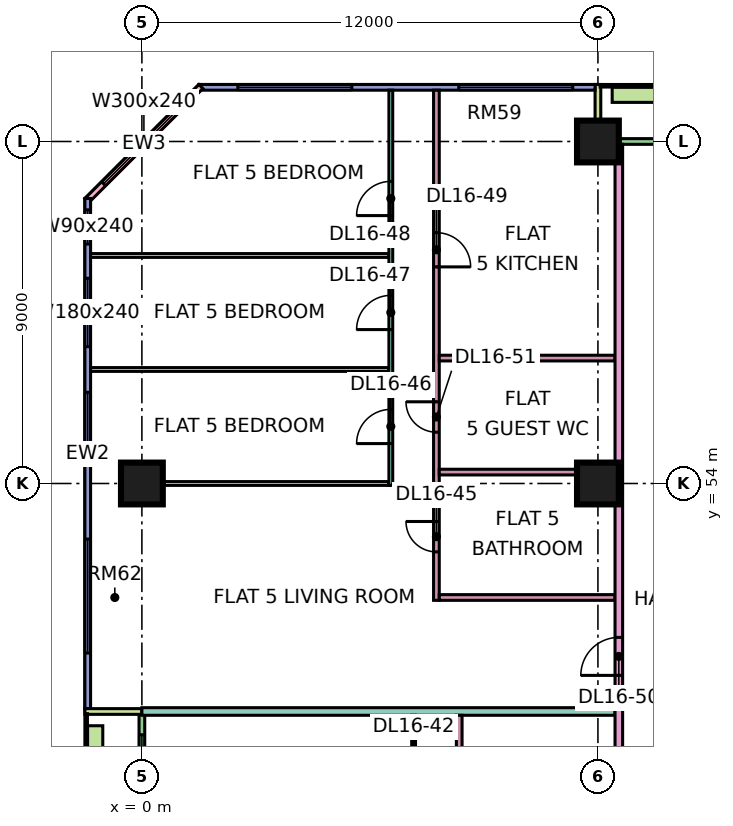
"""IFC4 building model, lengths in metres.
Left out: names, types, materials, properties, quantities, classifications, styles, units other than length and angle.
Written with IfcOpenShell. Run it as: python <this file> out.ifc"""

import sys

from ifc_helpers import new_model, si_unit, direction, frame, frame_2d, origin, origin_2d, place, context, subcontext, project, spatial, rectangle, extrude, element, fill, save


model = new_model("IFC4")
c1 = context("Model", 3, precision=1e-05, world=origin(), true_north=direction((0.0, 1.0)))
c2 = subcontext(c1, "Body", "Model", "MODEL_VIEW")
j1 = project(units=[si_unit("LENGTHUNIT", "METRE"), si_unit("PLANEANGLEUNIT", "RADIAN")], contexts=[c1])
p1 = place(None, origin())
s1 = spatial("IfcSite", under=j1, at=p1, CompositionType="ELEMENT")
p2 = place(p1, origin())
s2 = spatial("IfcBuilding", under=s1, at=p2, CompositionType="ELEMENT")
p3 = place(p2, frame((0.0, 0.0, 75.15)))
s3 = spatial("IfcBuildingStorey", under=s2, at=p3, CompositionType="ELEMENT", Elevation=75.15)
p4 = place(p3, frame((0.0, 54.0, 0.0), z_axis=(0.0, 0.0, 1.0), x_axis=(1.0, 0.0, 0.0)))
e1 = element("IfcColumn", 1, at=p4, inside=s3, PredefinedType="COLUMN", context=c2, shape_type="SweptSolid", body=[
    extrude(rectangle(XDim=1.1, YDim=1.1, at=origin_2d()), origin(), (0.0, 0.0, 1.0), 3.75),
])
for number, where, z_axis, x_axis in (
    (2, (12.0, 54.0, 0.0), (0.0, 0.0, 1.0), (1.0, 0.0, 0.0)),
    (3, (12.0, 63.0, 0.0), (0.0, 0.0, 1.0), (1.0, 0.0, 0.0)),
):
    element("IfcColumn", number, at=place(p3, frame(where, z_axis=z_axis, x_axis=x_axis)), inside=s3, PredefinedType="COLUMN", context=c2, shape_type="SweptSolid", body=[
        extrude(rectangle(XDim=1.1, YDim=1.1, at=origin_2d()), origin(), (0.0, 0.0, 1.0), 3.75),
    ])
p5 = place(p3, frame((22.425, 63.0, 0.0), z_axis=(0.0, 0.0, 1.0), x_axis=(-1.0, 0.0, 0.0)))
e4 = element("IfcWall", 4, at=p5, inside=s3, PredefinedType="SOLIDWALL", context=c2, shape_type="SweptSolid", body=[
    extrude(rectangle(XDim=10.35, YDim=0.15, at=frame_2d((5.175, 0.0))), origin(), (0.0, 0.0, 1.0), 3.35),
])
p6 = place(p5, frame((2.512, 0.0, 0.0)))
e5 = element("IfcOpeningElement", 5, at=p6, cuts=e4, PredefinedType="OPENING", context=c2, shape_type="SweptSolid", body=[
    extrude(rectangle(XDim=1.8, YDim=2.4, at=frame_2d((0.9, 1.2))), frame((0.0, 0.085, 0.0), z_axis=(0.0, -1.0, 0.0), x_axis=(1.0, 0.0, 0.0)), (0.0, 0.0, 1.0), 0.17),
])
p7 = place(p3, frame((12.0, 64.5, 0.0), z_axis=(0.0, 0.0, 1.0), x_axis=(0.0, -1.0, 0.0)))
e6 = element("IfcWall", 6, at=p7, inside=s3, PredefinedType="SOLIDWALL", context=c2, shape_type="SweptSolid", body=[
    extrude(rectangle(XDim=1.5, YDim=0.15, at=frame_2d((0.75, 0.0))), origin(), (0.0, 0.0, 1.0), 3.35),
])
p8 = place(p3, frame((11.925, 64.425, 0.0), z_axis=(0.0, 0.0, 1.0), x_axis=(-1.0, 0.0, 0.0)))
e7 = element("IfcWall", 7, at=p8, inside=s3, PredefinedType="SOLIDWALL", context=c2, shape_type="SweptSolid", body=[
    extrude(rectangle(XDim=10.425, YDim=0.15, at=frame_2d((5.212, 0.0))), origin(), (0.0, 0.0, 1.0), 3.35),
])
p9 = place(p8, frame((0.587, 0.0, 0.45)))
e8 = element("IfcOpeningElement", 8, at=p9, cuts=e7, PredefinedType="OPENING", context=c2, shape_type="SweptSolid", body=[
    extrude(rectangle(XDim=3.0, YDim=2.4, at=frame_2d((1.5, 1.2))), frame((0.0, 0.085, 0.0), z_axis=(0.0, -1.0, 0.0), x_axis=(1.0, 0.0, 0.0)), (0.0, 0.0, 1.0), 0.17),
])
p10 = place(p8, frame((6.4, 0.0, 0.45)))
e9 = element("IfcOpeningElement", 9, at=p10, cuts=e7, PredefinedType="OPENING", context=c2, shape_type="SweptSolid", body=[
    extrude(rectangle(XDim=3.0, YDim=2.4, at=frame_2d((1.5, 1.2))), frame((0.0, 0.085, 0.0), z_axis=(0.0, -1.0, 0.0), x_axis=(1.0, 0.0, 0.0)), (0.0, 0.0, 1.0), 0.17),
])
p11 = place(p3, frame((1.553, 64.447, 0.0), z_axis=(0.0, 0.0, 1.0), x_axis=(-0.707106781187, -0.707106781187, 0.0)))
e10 = element("IfcWall", 10, at=p11, inside=s3, PredefinedType="SOLIDWALL", context=c2, shape_type="SweptSolid", body=[
    extrude(rectangle(XDim=4.243, YDim=0.15, at=frame_2d((2.121, 0.0))), origin(), (0.0, 0.0, 1.0), 3.35),
])
p12 = place(p11, frame((0.621, 0.0, 0.45)))
e11 = element("IfcOpeningElement", 11, at=p12, cuts=e10, PredefinedType="OPENING", context=c2, shape_type="SweptSolid", body=[
    extrude(rectangle(XDim=3.0, YDim=2.4, at=frame_2d((1.5, 1.2))), frame((0.0, 0.085, 0.0), z_axis=(0.0, -1.0, 0.0), x_axis=(1.0, 0.0, 0.0)), (0.0, 0.0, 1.0), 0.17),
])
p13 = place(p3, frame((-1.425, 61.5, 0.0), z_axis=(0.0, 0.0, 1.0), x_axis=(0.0, -1.0, 0.0)))
e12 = element("IfcWall", 12, at=p13, inside=s3, PredefinedType="SOLIDWALL", context=c2, shape_type="SweptSolid", body=[
    extrude(rectangle(XDim=13.425, YDim=0.15, at=frame_2d((6.712, 0.0))), origin(), (0.0, 0.0, 1.0), 3.35),
])
p14 = place(p13, frame((0.3, 0.0, 0.45)))
e13 = element("IfcOpeningElement", 13, at=p14, cuts=e12, PredefinedType="OPENING", context=c2, shape_type="SweptSolid", body=[
    extrude(rectangle(XDim=0.9, YDim=2.4, at=frame_2d((0.45, 1.2))), frame((0.0, 0.085, 0.0), z_axis=(0.0, -1.0, 0.0), x_axis=(1.0, 0.0, 0.0)), (0.0, 0.0, 1.0), 0.17),
])
p15 = place(p13, frame((2.1, 0.0, 0.45)))
e14 = element("IfcOpeningElement", 14, at=p15, cuts=e12, PredefinedType="OPENING", context=c2, shape_type="SweptSolid", body=[
    extrude(rectangle(XDim=1.8, YDim=2.4, at=frame_2d((0.9, 1.2))), frame((0.0, 0.085, 0.0), z_axis=(0.0, -1.0, 0.0), x_axis=(1.0, 0.0, 0.0)), (0.0, 0.0, 1.0), 0.17),
])
p16 = place(p13, frame((5.1, 0.0, 0.45)))
e15 = element("IfcOpeningElement", 15, at=p16, cuts=e12, PredefinedType="OPENING", context=c2, shape_type="SweptSolid", body=[
    extrude(rectangle(XDim=1.8, YDim=2.4, at=frame_2d((0.9, 1.2))), frame((0.0, 0.085, 0.0), z_axis=(0.0, -1.0, 0.0), x_axis=(1.0, 0.0, 0.0)), (0.0, 0.0, 1.0), 0.17),
])
p17 = place(p13, frame((8.962, 0.0, 0.45)))
e16 = element("IfcOpeningElement", 16, at=p17, cuts=e12, PredefinedType="OPENING", context=c2, shape_type="SweptSolid", body=[
    extrude(rectangle(XDim=3.0, YDim=2.4, at=frame_2d((1.5, 1.2))), frame((0.0, 0.085, 0.0), z_axis=(0.0, -1.0, 0.0), x_axis=(1.0, 0.0, 0.0)), (0.0, 0.0, 1.0), 0.17),
])
p18 = place(p3, frame((0.0, 47.925, 0.0), z_axis=(0.0, 0.0, 1.0), x_axis=(0.0, -1.0, 0.0)))
e17 = element("IfcWall", 17, at=p18, inside=s3, PredefinedType="SOLIDWALL", context=c2, shape_type="SweptSolid", body=[
    extrude(rectangle(XDim=11.85, YDim=0.15, at=frame_2d((5.925, 0.0))), origin(), (0.0, 0.0, 1.0), 3.35),
])
p19 = place(p18, frame((0.538, 0.0, 0.45)))
e18 = element("IfcOpeningElement", 18, at=p19, cuts=e17, PredefinedType="OPENING", context=c2, shape_type="SweptSolid", body=[
    extrude(rectangle(XDim=1.2, YDim=2.4, at=frame_2d((0.6, 1.2))), frame((0.0, 0.085, 0.0), z_axis=(0.0, -1.0, 0.0), x_axis=(1.0, 0.0, 0.0)), (0.0, 0.0, 1.0), 0.17),
])
p20 = place(p18, frame((4.15, 0.0, 0.45)))
e19 = element("IfcOpeningElement", 19, at=p20, cuts=e17, PredefinedType="OPENING", context=c2, shape_type="SweptSolid", body=[
    extrude(rectangle(XDim=1.2, YDim=2.4, at=frame_2d((0.6, 1.2))), frame((0.0, 0.085, 0.0), z_axis=(0.0, -1.0, 0.0), x_axis=(1.0, 0.0, 0.0)), (0.0, 0.0, 1.0), 0.17),
])
p21 = place(p18, frame((6.525, 0.0, 0.0)))
e20 = element("IfcOpeningElement", 20, at=p21, cuts=e17, PredefinedType="OPENING", context=c2, shape_type="SweptSolid", body=[
    extrude(rectangle(XDim=1.8, YDim=2.4, at=frame_2d((0.9, 1.2))), frame((0.0, 0.085, 0.0), z_axis=(0.0, -1.0, 0.0), x_axis=(1.0, 0.0, 0.0)), (0.0, 0.0, 1.0), 0.17),
])
p22 = place(p18, frame((9.5, 0.0, 0.45)))
e21 = element("IfcOpeningElement", 21, at=p22, cuts=e17, PredefinedType="OPENING", context=c2, shape_type="SweptSolid", body=[
    extrude(rectangle(XDim=1.2, YDim=2.4, at=frame_2d((0.6, 1.2))), frame((0.0, 0.085, 0.0), z_axis=(0.0, -1.0, 0.0), x_axis=(1.0, 0.0, 0.0)), (0.0, 0.0, 1.0), 0.17),
])
p23 = place(p3, frame((-1.5, 48.0, 0.0), z_axis=(0.0, 0.0, 1.0), x_axis=(1.0, 0.0, 0.0)))
e22 = element("IfcWall", 22, at=p23, inside=s3, PredefinedType="SOLIDWALL", context=c2, shape_type="SweptSolid", body=[
    extrude(rectangle(XDim=1.5, YDim=0.15, at=frame_2d((0.75, 0.0))), origin(), (0.0, 0.0, 1.0), 3.35),
])
p24 = place(p3, frame((22.125, 64.229, 0.0), z_axis=(0.0, 0.0, 1.0), x_axis=(-1.0, 0.0, 0.0)))
e23 = element("IfcWall", 23, at=p24, inside=s3, PredefinedType="SOLIDWALL", context=c2, shape_type="SweptSolid", body=[
    extrude(rectangle(XDim=9.75, YDim=0.4, at=frame_2d((4.875, 0.0))), origin(), (0.0, 0.0, 1.0), 0.7),
])
p25 = place(p3, frame((-1.229, 47.625, 0.0), z_axis=(0.0, 0.0, 1.0), x_axis=(0.0, -1.0, 0.0)))
e24 = element("IfcWall", 24, at=p25, inside=s3, PredefinedType="SOLIDWALL", context=c2, shape_type="SweptSolid", body=[
    extrude(rectangle(XDim=11.25, YDim=0.4, at=frame_2d((5.625, 0.0))), origin(), (0.0, 0.0, 1.0), 0.7),
])
for number, where, z_axis, x_axis in (
    (25, (-1.351, 57.0, 0.0), (0.0, 0.0, 1.0), (1.0, 0.0, 0.0)),
    (26, (-1.351, 60.0, 0.0), (0.0, 0.0, 1.0), (1.0, 0.0, 0.0)),
):
    element("IfcWall", number, at=place(p3, frame(where, z_axis=z_axis, x_axis=x_axis)), inside=s3, PredefinedType="PARTITIONING", context=c2, shape_type="SweptSolid", body=[
        extrude(rectangle(XDim=7.851, YDim=0.1, at=frame_2d((3.926, 0.0))), origin(), (0.0, 0.0, 1.0), 3.35),
    ])
p26 = place(p3, frame((0.0, 48.0, 0.0), z_axis=(0.0, 0.0, 1.0), x_axis=(1.0, 0.0, 0.0)))
e27 = element("IfcWall", 27, at=p26, inside=s3, PredefinedType="PARTITIONING", context=c2, shape_type="SweptSolid", body=[
    extrude(rectangle(XDim=12.45, YDim=0.2, at=frame_2d((6.225, 0.0))), origin(), (0.0, 0.0, 1.0), 3.35),
])
e28 = element("IfcWall", 28, at=p4, inside=s3, PredefinedType="PARTITIONING", context=c2, shape_type="SweptSolid", body=[
    extrude(rectangle(XDim=6.5, YDim=0.1, at=frame_2d((3.25, 0.0))), origin(), (0.0, 0.0, 1.0), 3.35),
])
p27 = place(p3, frame((6.55, 53.95, 0.0), z_axis=(0.0, 0.0, 1.0), x_axis=(0.0, 1.0, 0.0)))
e29 = element("IfcWall", 29, at=p27, inside=s3, PredefinedType="PARTITIONING", context=c2, shape_type="SweptSolid", body=[
    extrude(rectangle(XDim=10.4, YDim=0.1, at=frame_2d((5.2, 0.0))), origin(), (0.0, 0.0, 1.0), 3.35),
])
p28 = place(p27, frame((1.1, 0.0, 0.0)))
e30 = element("IfcOpeningElement", 30, at=p28, cuts=e29, PredefinedType="OPENING", context=c2, shape_type="SweptSolid", body=[
    extrude(rectangle(XDim=0.9, YDim=2.1, at=frame_2d((0.45, 1.05))), frame((0.0, 0.06, 0.0), z_axis=(0.0, -1.0, 0.0), x_axis=(1.0, 0.0, 0.0)), (0.0, 0.0, 1.0), 0.12),
])
p29 = place(p27, frame((4.1, 0.0, 0.0)))
e31 = element("IfcOpeningElement", 31, at=p29, cuts=e29, PredefinedType="OPENING", context=c2, shape_type="SweptSolid", body=[
    extrude(rectangle(XDim=0.9, YDim=2.1, at=frame_2d((0.45, 1.05))), frame((0.0, 0.06, 0.0), z_axis=(0.0, -1.0, 0.0), x_axis=(1.0, 0.0, 0.0)), (0.0, 0.0, 1.0), 0.12),
])
p30 = place(p27, frame((7.1, 0.0, 0.0)))
e32 = element("IfcOpeningElement", 32, at=p30, cuts=e29, PredefinedType="OPENING", context=c2, shape_type="SweptSolid", body=[
    extrude(rectangle(XDim=0.9, YDim=2.1, at=frame_2d((0.45, 1.05))), frame((0.0, 0.06, 0.0), z_axis=(0.0, -1.0, 0.0), x_axis=(1.0, 0.0, 0.0)), (0.0, 0.0, 1.0), 0.12),
])
p31 = place(p3, frame((7.15, 42.05, 0.0), z_axis=(0.0, 0.0, 1.0), x_axis=(0.0, 1.0, 0.0)))
e33 = element("IfcWall", 33, at=p31, inside=s3, PredefinedType="PARTITIONING", context=c2, shape_type="SweptSolid", body=[
    extrude(rectangle(XDim=5.85, YDim=0.1, at=frame_2d((2.925, 0.0))), origin(), (0.0, 0.0, 1.0), 3.35),
])
p32 = place(p31, frame((1.0, 0.0, 0.0)))
e34 = element("IfcOpeningElement", 34, at=p32, cuts=e33, PredefinedType="OPENING", context=c2, shape_type="SweptSolid", body=[
    extrude(rectangle(XDim=0.9, YDim=2.1, at=frame_2d((0.45, 1.05))), frame((0.0, 0.06, 0.0), z_axis=(0.0, -1.0, 0.0), x_axis=(1.0, 0.0, 0.0)), (0.0, 0.0, 1.0), 0.12),
])
p33 = place(p31, frame((4.0, 0.0, 0.0)))
e35 = element("IfcOpeningElement", 35, at=p33, cuts=e33, PredefinedType="OPENING", context=c2, shape_type="SweptSolid", body=[
    extrude(rectangle(XDim=0.9, YDim=2.1, at=frame_2d((0.45, 1.05))), frame((0.0, 0.06, 0.0), z_axis=(0.0, -1.0, 0.0), x_axis=(1.0, 0.0, 0.0)), (0.0, 0.0, 1.0), 0.12),
])
p34 = place(p3, frame((7.75, 50.925, 0.0), z_axis=(0.0, 0.0, 1.0), x_axis=(0.0, 1.0, 0.0)))
e36 = element("IfcWall", 36, at=p34, inside=s3, PredefinedType="PARTITIONING", context=c2, shape_type="SweptSolid", body=[
    extrude(rectangle(XDim=13.425, YDim=0.15, at=frame_2d((6.712, 0.0))), origin(), (0.0, 0.0, 1.0), 3.35),
])
p35 = place(p34, frame((1.275, 0.0, 0.0)))
e37 = element("IfcOpeningElement", 37, at=p35, cuts=e36, PredefinedType="OPENING", context=c2, shape_type="SweptSolid", body=[
    extrude(rectangle(XDim=0.8, YDim=2.1, at=frame_2d((0.4, 1.05))), frame((0.0, 0.085, 0.0), z_axis=(0.0, -1.0, 0.0), x_axis=(1.0, 0.0, 0.0)), (0.0, 0.0, 1.0), 0.17),
])
p36 = place(p34, frame((8.775, 0.0, 0.0)))
e38 = element("IfcOpeningElement", 38, at=p36, cuts=e36, PredefinedType="OPENING", context=c2, shape_type="SweptSolid", body=[
    extrude(rectangle(XDim=0.9, YDim=2.1, at=frame_2d((0.45, 1.05))), frame((0.0, 0.085, 0.0), z_axis=(0.0, -1.0, 0.0), x_axis=(1.0, 0.0, 0.0)), (0.0, 0.0, 1.0), 0.17),
])
p37 = place(p34, frame((4.425, 0.0, 0.0)))
e39 = element("IfcOpeningElement", 39, at=p37, cuts=e36, PredefinedType="OPENING", context=c2, shape_type="SweptSolid", body=[
    extrude(rectangle(XDim=0.8, YDim=2.1, at=frame_2d((0.4, 1.05))), frame((0.0, 0.085, 0.0), z_axis=(0.0, -1.0, 0.0), x_axis=(1.0, 0.0, 0.0)), (0.0, 0.0, 1.0), 0.17),
])
for number, where, z_axis, x_axis in (
    (40, (7.825, 51.0, 0.0), (0.0, 0.0, 1.0), (1.0, 0.0, 0.0)),
    (41, (7.825, 54.3, 0.0), (0.0, 0.0, 1.0), (1.0, 0.0, 0.0)),
    (42, (7.825, 57.3, 0.0), (0.0, 0.0, 1.0), (1.0, 0.0, 0.0)),
):
    element("IfcWall", number, at=place(p3, frame(where, z_axis=z_axis, x_axis=x_axis)), inside=s3, PredefinedType="PARTITIONING", context=c2, shape_type="SweptSolid", body=[
        extrude(rectangle(XDim=4.625, YDim=0.15, at=frame_2d((2.312, 0.0))), origin(), (0.0, 0.0, 1.0), 3.35),
    ])
p38 = place(p3, frame((8.35, 39.225, 0.0), z_axis=(0.0, 0.0, 1.0), x_axis=(0.0, 1.0, 0.0)))
e43 = element("IfcWall", 43, at=p38, inside=s3, PredefinedType="PARTITIONING", context=c2, shape_type="SweptSolid", body=[
    extrude(rectangle(XDim=8.675, YDim=0.15, at=frame_2d((4.337, 0.0))), origin(), (0.0, 0.0, 1.0), 3.35),
])
p39 = place(p38, frame((5.025, 0.0, 0.0)))
e44 = element("IfcOpeningElement", 44, at=p39, cuts=e43, PredefinedType="OPENING", context=c2, shape_type="SweptSolid", body=[
    extrude(rectangle(XDim=0.9, YDim=2.1, at=frame_2d((0.45, 1.05))), frame((0.0, 0.085, 0.0), z_axis=(0.0, -1.0, 0.0), x_axis=(1.0, 0.0, 0.0)), (0.0, 0.0, 1.0), 0.17),
])
p40 = place(p3, frame((12.55, 20.0, 0.0), z_axis=(0.0, 0.0, 1.0), x_axis=(0.0, 1.0, 0.0)))
e45 = element("IfcWall", 45, at=p40, inside=s3, PredefinedType="PARTITIONING", context=c2, shape_type="SweptSolid", body=[
    extrude(rectangle(XDim=42.926, YDim=0.2, at=frame_2d((21.463, 0.0))), origin(), (0.0, 0.0, 1.0), 3.35),
])
p41 = place(p40, frame((17.1, 0.0, 0.0)))
e46 = element("IfcOpeningElement", 46, at=p41, cuts=e45, PredefinedType="OPENING", context=c2, shape_type="SweptSolid", body=[
    extrude(rectangle(XDim=1.0, YDim=2.1, at=frame_2d((0.5, 1.05))), frame((0.0, 0.11, 0.0), z_axis=(0.0, -1.0, 0.0), x_axis=(1.0, 0.0, 0.0)), (0.0, 0.0, 1.0), 0.22),
])
p42 = place(p40, frame((28.95, 0.0, 0.0)))
e47 = element("IfcOpeningElement", 47, at=p42, cuts=e45, PredefinedType="OPENING", context=c2, shape_type="SweptSolid", body=[
    extrude(rectangle(XDim=1.0, YDim=2.1, at=frame_2d((0.5, 1.05))), frame((0.0, 0.11, 0.0), z_axis=(0.0, -1.0, 0.0), x_axis=(1.0, 0.0, 0.0)), (0.0, 0.0, 1.0), 0.22),
])
p43 = place(p40, frame((0.6, 0.0, 0.0)))
e48 = element("IfcOpeningElement", 48, at=p43, cuts=e45, PredefinedType="OPENING", context=c2, shape_type="SweptSolid", body=[
    extrude(rectangle(XDim=1.2, YDim=2.1, at=frame_2d((0.6, 1.05))), frame((0.0, 0.11, 0.0), z_axis=(0.0, -1.0, 0.0), x_axis=(1.0, 0.0, 0.0)), (0.0, 0.0, 1.0), 0.22),
])
p44 = place(p40, frame((11.1, 0.0, 0.0)))
e49 = element("IfcOpeningElement", 49, at=p44, cuts=e45, PredefinedType="OPENING", context=c2, shape_type="SweptSolid", body=[
    extrude(rectangle(XDim=1.0, YDim=2.1, at=frame_2d((0.5, 1.05))), frame((0.0, 0.11, 0.0), z_axis=(0.0, -1.0, 0.0), x_axis=(1.0, 0.0, 0.0)), (0.0, 0.0, 1.0), 0.22),
])
p45 = place(p9, origin())
e50 = element("IfcWindow", 50, at=p45, inside=s3, PartitioningType="SINGLE_PANEL", PredefinedType="WINDOW", context=c2, shape_type="SweptSolid", body=[
    extrude(rectangle(XDim=3.0, YDim=2.4, at=frame_2d((1.5, 1.2))), frame((0.0, 0.03, 0.0), z_axis=(0.0, -1.0, 0.0), x_axis=(1.0, 0.0, 0.0)), (0.0, 0.0, 1.0), 0.06),
])
fill(e8, e50)
p46 = place(p10, origin())
e51 = element("IfcWindow", 51, at=p46, inside=s3, PartitioningType="SINGLE_PANEL", PredefinedType="WINDOW", context=c2, shape_type="SweptSolid", body=[
    extrude(rectangle(XDim=3.0, YDim=2.4, at=frame_2d((1.5, 1.2))), frame((0.0, 0.03, 0.0), z_axis=(0.0, -1.0, 0.0), x_axis=(1.0, 0.0, 0.0)), (0.0, 0.0, 1.0), 0.06),
])
fill(e9, e51)
p47 = place(p12, origin())
e52 = element("IfcWindow", 52, at=p47, inside=s3, PartitioningType="SINGLE_PANEL", PredefinedType="WINDOW", context=c2, shape_type="SweptSolid", body=[
    extrude(rectangle(XDim=3.0, YDim=2.4, at=frame_2d((1.5, 1.2))), frame((0.0, 0.03, 0.0), z_axis=(0.0, -1.0, 0.0), x_axis=(1.0, 0.0, 0.0)), (0.0, 0.0, 1.0), 0.06),
])
fill(e11, e52)
p48 = place(p14, origin())
e53 = element("IfcWindow", 53, at=p48, inside=s3, PartitioningType="SINGLE_PANEL", PredefinedType="WINDOW", context=c2, shape_type="SweptSolid", body=[
    extrude(rectangle(XDim=0.9, YDim=2.4, at=frame_2d((0.45, 1.2))), frame((0.0, 0.03, 0.0), z_axis=(0.0, -1.0, 0.0), x_axis=(1.0, 0.0, 0.0)), (0.0, 0.0, 1.0), 0.06),
])
fill(e13, e53)
p49 = place(p15, origin())
e54 = element("IfcWindow", 54, at=p49, inside=s3, PartitioningType="SINGLE_PANEL", PredefinedType="WINDOW", context=c2, shape_type="SweptSolid", body=[
    extrude(rectangle(XDim=1.8, YDim=2.4, at=frame_2d((0.9, 1.2))), frame((0.0, 0.03, 0.0), z_axis=(0.0, -1.0, 0.0), x_axis=(1.0, 0.0, 0.0)), (0.0, 0.0, 1.0), 0.06),
])
fill(e14, e54)
p50 = place(p16, origin())
e55 = element("IfcWindow", 55, at=p50, inside=s3, PartitioningType="SINGLE_PANEL", PredefinedType="WINDOW", context=c2, shape_type="SweptSolid", body=[
    extrude(rectangle(XDim=1.8, YDim=2.4, at=frame_2d((0.9, 1.2))), frame((0.0, 0.03, 0.0), z_axis=(0.0, -1.0, 0.0), x_axis=(1.0, 0.0, 0.0)), (0.0, 0.0, 1.0), 0.06),
])
fill(e15, e55)
p51 = place(p17, origin())
e56 = element("IfcWindow", 56, at=p51, inside=s3, PartitioningType="SINGLE_PANEL", PredefinedType="WINDOW", context=c2, shape_type="SweptSolid", body=[
    extrude(rectangle(XDim=3.0, YDim=2.4, at=frame_2d((1.5, 1.2))), frame((0.0, 0.03, 0.0), z_axis=(0.0, -1.0, 0.0), x_axis=(1.0, 0.0, 0.0)), (0.0, 0.0, 1.0), 0.06),
])
fill(e16, e56)
p52 = place(p19, origin())
e57 = element("IfcWindow", 57, at=p52, inside=s3, PartitioningType="SINGLE_PANEL", PredefinedType="WINDOW", context=c2, shape_type="SweptSolid", body=[
    extrude(rectangle(XDim=1.2, YDim=2.4, at=frame_2d((0.6, 1.2))), frame((0.0, 0.03, 0.0), z_axis=(0.0, -1.0, 0.0), x_axis=(1.0, 0.0, 0.0)), (0.0, 0.0, 1.0), 0.06),
])
fill(e18, e57)
p53 = place(p35, frame((0.8, 0.0, 0.0), z_axis=(0.0, 0.0, 1.0), x_axis=(-1.0, 0.0, 0.0)))
e58 = element("IfcDoor", 58, at=p53, inside=s3, OperationType="SINGLE_SWING_RIGHT", PredefinedType="DOOR", context=c2, shape_type="SweptSolid", body=[
    extrude(rectangle(XDim=0.8, YDim=2.1, at=frame_2d((0.4, 1.05))), frame((0.0, 0.025, 0.0), z_axis=(0.0, -1.0, 0.0), x_axis=(1.0, 0.0, 0.0)), (0.0, 0.0, 1.0), 0.05),
])
fill(e37, e58)
p54 = place(p28, origin())
e59 = element("IfcDoor", 59, at=p54, inside=s3, OperationType="SINGLE_SWING_LEFT", PredefinedType="DOOR", context=c2, shape_type="SweptSolid", body=[
    extrude(rectangle(XDim=0.9, YDim=2.1, at=frame_2d((0.45, 1.05))), frame((0.0, 0.025, 0.0), z_axis=(0.0, -1.0, 0.0), x_axis=(1.0, 0.0, 0.0)), (0.0, 0.0, 1.0), 0.05),
])
fill(e30, e59)
p55 = place(p29, origin())
e60 = element("IfcDoor", 60, at=p55, inside=s3, OperationType="SINGLE_SWING_LEFT", PredefinedType="DOOR", context=c2, shape_type="SweptSolid", body=[
    extrude(rectangle(XDim=0.9, YDim=2.1, at=frame_2d((0.45, 1.05))), frame((0.0, 0.025, 0.0), z_axis=(0.0, -1.0, 0.0), x_axis=(1.0, 0.0, 0.0)), (0.0, 0.0, 1.0), 0.05),
])
fill(e31, e60)
p56 = place(p30, origin())
e61 = element("IfcDoor", 61, at=p56, inside=s3, OperationType="SINGLE_SWING_LEFT", PredefinedType="DOOR", context=c2, shape_type="SweptSolid", body=[
    extrude(rectangle(XDim=0.9, YDim=2.1, at=frame_2d((0.45, 1.05))), frame((0.0, 0.025, 0.0), z_axis=(0.0, -1.0, 0.0), x_axis=(1.0, 0.0, 0.0)), (0.0, 0.0, 1.0), 0.05),
])
fill(e32, e61)
p57 = place(p36, frame((0.9, 0.0, 0.0), z_axis=(0.0, 0.0, 1.0), x_axis=(-1.0, 0.0, 0.0)))
e62 = element("IfcDoor", 62, at=p57, inside=s3, OperationType="SINGLE_SWING_LEFT", PredefinedType="DOOR", context=c2, shape_type="SweptSolid", body=[
    extrude(rectangle(XDim=0.9, YDim=2.1, at=frame_2d((0.45, 1.05))), frame((0.0, 0.025, 0.0), z_axis=(0.0, -1.0, 0.0), x_axis=(1.0, 0.0, 0.0)), (0.0, 0.0, 1.0), 0.05),
])
fill(e38, e62)
p58 = place(p42, origin())
e63 = element("IfcDoor", 63, at=p58, inside=s3, OperationType="SINGLE_SWING_LEFT", PredefinedType="DOOR", context=c2, shape_type="SweptSolid", body=[
    extrude(rectangle(XDim=1.0, YDim=2.1, at=frame_2d((0.5, 1.05))), frame((0.0, 0.025, 0.0), z_axis=(0.0, -1.0, 0.0), x_axis=(1.0, 0.0, 0.0)), (0.0, 0.0, 1.0), 0.05),
])
fill(e47, e63)
p59 = place(p37, frame((0.8, 0.0, 0.0), z_axis=(0.0, 0.0, 1.0), x_axis=(-1.0, 0.0, 0.0)))
e64 = element("IfcDoor", 64, at=p59, inside=s3, OperationType="SINGLE_SWING_RIGHT", PredefinedType="DOOR", context=c2, shape_type="SweptSolid", body=[
    extrude(rectangle(XDim=0.8, YDim=2.1, at=frame_2d((0.4, 1.05))), frame((0.0, 0.025, 0.0), z_axis=(0.0, -1.0, 0.0), x_axis=(1.0, 0.0, 0.0)), (0.0, 0.0, 1.0), 0.05),
])
fill(e39, e64)
save(model, sys.argv[1])
